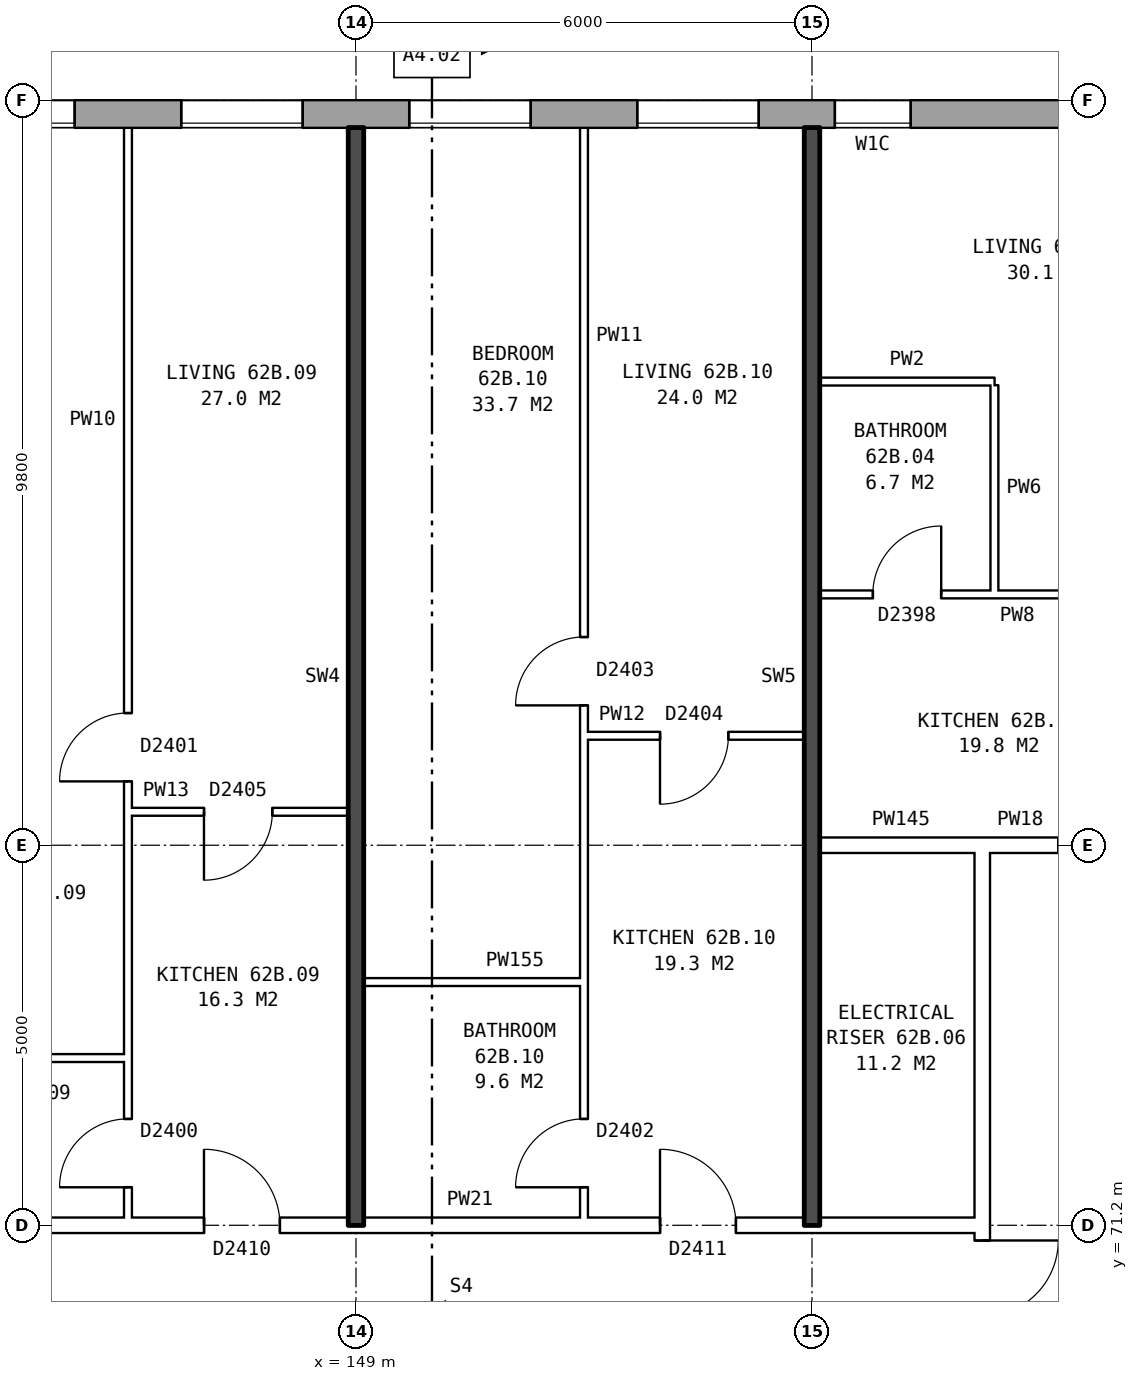
"""IFC4 building model, lengths in metres.
Left out: names, types, materials, properties, quantities, classifications, styles, units other than length and angle.
Written with IfcOpenShell. Run it as: python <this file> out.ifc"""

import sys

from ifc_helpers import new_model, si_unit, direction, frame, frame_2d, origin, place, context, subcontext, project, spatial, rectangle, extrude, element, fill, save


model = new_model("IFC4")
c1 = context("Model", 3, precision=1e-05, world=origin(), true_north=direction((0.0, 1.0)))
c2 = subcontext(c1, "Body", "Model", "MODEL_VIEW")
j1 = project(units=[si_unit("LENGTHUNIT", "METRE"), si_unit("PLANEANGLEUNIT", "RADIAN")], contexts=[c1])
p1 = place(None, origin())
s1 = spatial("IfcSite", under=j1, at=p1, CompositionType="ELEMENT")
p2 = place(p1, origin())
s2 = spatial("IfcBuilding", under=s1, at=p2, CompositionType="ELEMENT")
p3 = place(p2, frame((0.0, 0.0, 221.4)))
s3 = spatial("IfcBuildingStorey", under=s2, at=p3, CompositionType="ELEMENT", Elevation=221.4)
p4 = place(p3, frame((165.925, 85.82, 0.0), z_axis=(0.0, 0.0, 1.0), x_axis=(-1.0, 0.0, 0.0)))
e1 = element("IfcWall", 1, at=p4, inside=s3, PredefinedType="STANDARD", context=c2, shape_type="SweptSolid", body=[
    extrude(rectangle(XDim=33.875, YDim=0.36, at=frame_2d((16.938, 0.0))), origin(), (0.0, 0.0, 1.0), 2.85),
])
p5 = place(p4, frame((2.625, 0.0, 0.8)))
e2 = element("IfcOpeningElement", 2, at=p5, cuts=e1, PredefinedType="OPENING", context=c2, shape_type="SweptSolid", body=[
    extrude(rectangle(XDim=1.6, YDim=1.8, at=frame_2d((0.8, 0.9))), frame((0.0, 0.19, 0.0), z_axis=(0.0, -1.0, 0.0), x_axis=(1.0, 0.0, 0.0)), (0.0, 0.0, 1.0), 0.38),
])
p6 = place(p4, frame((5.625, 0.0, 0.8)))
e3 = element("IfcOpeningElement", 3, at=p6, cuts=e1, PredefinedType="OPENING", context=c2, shape_type="SweptSolid", body=[
    extrude(rectangle(XDim=1.6, YDim=1.8, at=frame_2d((0.8, 0.9))), frame((0.0, 0.19, 0.0), z_axis=(0.0, -1.0, 0.0), x_axis=(1.0, 0.0, 0.0)), (0.0, 0.0, 1.0), 0.38),
])
p7 = place(p4, frame((9.625, 0.0, 0.8)))
e4 = element("IfcOpeningElement", 4, at=p7, cuts=e1, PredefinedType="OPENING", context=c2, shape_type="SweptSolid", body=[
    extrude(rectangle(XDim=1.0, YDim=1.8, at=frame_2d((0.5, 0.9))), frame((0.0, 0.19, 0.0), z_axis=(0.0, -1.0, 0.0), x_axis=(1.0, 0.0, 0.0)), (0.0, 0.0, 1.0), 0.38),
])
p8 = place(p4, frame((11.625, 0.0, 0.8)))
e5 = element("IfcOpeningElement", 5, at=p8, cuts=e1, PredefinedType="OPENING", context=c2, shape_type="SweptSolid", body=[
    extrude(rectangle(XDim=1.6, YDim=1.8, at=frame_2d((0.8, 0.9))), frame((0.0, 0.19, 0.0), z_axis=(0.0, -1.0, 0.0), x_axis=(1.0, 0.0, 0.0)), (0.0, 0.0, 1.0), 0.38),
])
p9 = place(p4, frame((14.625, 0.0, 0.8)))
e6 = element("IfcOpeningElement", 6, at=p9, cuts=e1, PredefinedType="OPENING", context=c2, shape_type="SweptSolid", body=[
    extrude(rectangle(XDim=1.6, YDim=1.8, at=frame_2d((0.8, 0.9))), frame((0.0, 0.19, 0.0), z_axis=(0.0, -1.0, 0.0), x_axis=(1.0, 0.0, 0.0)), (0.0, 0.0, 1.0), 0.38),
])
p10 = place(p4, frame((17.625, 0.0, 0.8)))
e7 = element("IfcOpeningElement", 7, at=p10, cuts=e1, PredefinedType="OPENING", context=c2, shape_type="SweptSolid", body=[
    extrude(rectangle(XDim=1.6, YDim=1.8, at=frame_2d((0.8, 0.9))), frame((0.0, 0.19, 0.0), z_axis=(0.0, -1.0, 0.0), x_axis=(1.0, 0.0, 0.0)), (0.0, 0.0, 1.0), 0.38),
])
p11 = place(p4, frame((20.625, 0.0, 0.8)))
e8 = element("IfcOpeningElement", 8, at=p11, cuts=e1, PredefinedType="OPENING", context=c2, shape_type="SweptSolid", body=[
    extrude(rectangle(XDim=1.6, YDim=1.8, at=frame_2d((0.8, 0.9))), frame((0.0, 0.19, 0.0), z_axis=(0.0, -1.0, 0.0), x_axis=(1.0, 0.0, 0.0)), (0.0, 0.0, 1.0), 0.38),
])
p12 = place(p4, frame((23.825, 0.0, 1.7)))
e9 = element("IfcOpeningElement", 9, at=p12, cuts=e1, PredefinedType="OPENING", context=c2, shape_type="SweptSolid", body=[
    extrude(rectangle(XDim=0.6, YDim=0.9, at=frame_2d((0.3, 0.45))), frame((0.0, 0.19, 0.0), z_axis=(0.0, -1.0, 0.0), x_axis=(1.0, 0.0, 0.0)), (0.0, 0.0, 1.0), 0.38),
])
p13 = place(p4, frame((26.625, 0.0, 0.8)))
e10 = element("IfcOpeningElement", 10, at=p13, cuts=e1, PredefinedType="OPENING", context=c2, shape_type="SweptSolid", body=[
    extrude(rectangle(XDim=1.6, YDim=1.8, at=frame_2d((0.8, 0.9))), frame((0.0, 0.19, 0.0), z_axis=(0.0, -1.0, 0.0), x_axis=(1.0, 0.0, 0.0)), (0.0, 0.0, 1.0), 0.38),
])
p14 = place(p4, frame((29.625, 0.0, 0.8)))
e11 = element("IfcOpeningElement", 11, at=p14, cuts=e1, PredefinedType="OPENING", context=c2, shape_type="SweptSolid", body=[
    extrude(rectangle(XDim=1.6, YDim=1.8, at=frame_2d((0.8, 0.9))), frame((0.0, 0.19, 0.0), z_axis=(0.0, -1.0, 0.0), x_axis=(1.0, 0.0, 0.0)), (0.0, 0.0, 1.0), 0.38),
])
p15 = place(p4, frame((24.725, 0.0, 0.8)))
e12 = element("IfcOpeningElement", 12, at=p15, cuts=e1, PredefinedType="OPENING", context=c2, shape_type="SweptSolid", body=[
    extrude(rectangle(XDim=1.6, YDim=1.8, at=frame_2d((0.8, 0.9))), frame((0.0, 0.19, 0.0), z_axis=(0.0, -1.0, 0.0), x_axis=(1.0, 0.0, 0.0)), (0.0, 0.0, 1.0), 0.38),
])
p16 = place(p3, frame((157.24, 63.9, 0.0), z_axis=(0.0, 0.0, 1.0), x_axis=(0.0, 1.0, 0.0)))
e13 = element("IfcWall", 13, at=p16, inside=s3, PredefinedType="PARTITIONING", context=c2, shape_type="SweptSolid", body=[
    extrude(rectangle(XDim=12.2, YDim=0.2, at=frame_2d((6.1, 0.0))), origin(), (0.0, 0.0, 1.0), 2.85),
])
p17 = place(p16, frame((5.1, 0.0, 0.0)))
e14 = element("IfcOpeningElement", 14, at=p17, cuts=e13, PredefinedType="OPENING", context=c2, shape_type="SweptSolid", body=[
    extrude(rectangle(XDim=2.0, YDim=2.1, at=frame_2d((1.0, 1.05))), frame((0.0, 0.11, 0.0), z_axis=(0.0, -1.0, 0.0), x_axis=(1.0, 0.0, 0.0)), (0.0, 0.0, 1.0), 0.22),
])
p18 = place(p3, frame((142.76, 71.2, 0.0), z_axis=(0.0, 0.0, 1.0), x_axis=(1.0, 0.0, 0.0)))
e15 = element("IfcWall", 15, at=p18, inside=s3, PredefinedType="PARTITIONING", context=c2, shape_type="SweptSolid", body=[
    extrude(rectangle(XDim=14.48, YDim=0.2, at=frame_2d((7.24, 0.0))), origin(), (0.0, 0.0, 1.0), 2.85),
])
p19 = place(p18, frame((4.24, 0.0, 0.0)))
e16 = element("IfcOpeningElement", 16, at=p19, cuts=e15, PredefinedType="OPENING", context=c2, shape_type="SweptSolid", body=[
    extrude(rectangle(XDim=1.0, YDim=2.1, at=frame_2d((0.5, 1.05))), frame((0.0, 0.11, 0.0), z_axis=(0.0, -1.0, 0.0), x_axis=(1.0, 0.0, 0.0)), (0.0, 0.0, 1.0), 0.22),
])
p20 = place(p18, frame((10.24, 0.0, 0.0)))
e17 = element("IfcOpeningElement", 17, at=p20, cuts=e15, PredefinedType="OPENING", context=c2, shape_type="SweptSolid", body=[
    extrude(rectangle(XDim=1.0, YDim=2.1, at=frame_2d((0.5, 1.05))), frame((0.0, 0.11, 0.0), z_axis=(0.0, -1.0, 0.0), x_axis=(1.0, 0.0, 0.0)), (0.0, 0.0, 1.0), 0.22),
])
p21 = place(p3, frame((142.76, 73.4, 0.0), z_axis=(0.0, 0.0, 1.0), x_axis=(1.0, 0.0, 0.0)))
e18 = element("IfcWall", 18, at=p21, inside=s3, PredefinedType="PARTITIONING", context=c2, shape_type="SweptSolid", body=[
    extrude(rectangle(XDim=3.24, YDim=0.1, at=frame_2d((1.62, 0.0))), origin(), (0.0, 0.0, 1.0), 2.85),
])
p22 = place(p3, frame((149.1, 74.4, 0.0), z_axis=(0.0, 0.0, 1.0), x_axis=(1.0, 0.0, 0.0)))
e19 = element("IfcWall", 19, at=p22, inside=s3, PredefinedType="PARTITIONING", context=c2, shape_type="SweptSolid", body=[
    extrude(rectangle(XDim=2.9, YDim=0.1, at=frame_2d((1.45, 0.0))), origin(), (0.0, 0.0, 1.0), 2.85),
])
p23 = place(p3, frame((155.1, 76.2, 0.0), z_axis=(0.0, 0.0, 1.0), x_axis=(1.0, 0.0, 0.0)))
e20 = element("IfcWall", 20, at=p23, inside=s3, PredefinedType="PARTITIONING", context=c2, shape_type="SweptSolid", body=[
    extrude(rectangle(XDim=2.14, YDim=0.2, at=frame_2d((1.07, 0.0))), origin(), (0.0, 0.0, 1.0), 2.85),
])
p24 = place(p3, frame((157.24, 76.2, 0.0), z_axis=(0.0, 0.0, 1.0), x_axis=(1.0, 0.0, 0.0)))
e21 = element("IfcWall", 21, at=p24, inside=s3, PredefinedType="PARTITIONING", context=c2, shape_type="SweptSolid", body=[
    extrude(rectangle(XDim=3.0, YDim=0.2, at=frame_2d((1.5, 0.0))), origin(), (0.0, 0.0, 1.0), 2.85),
])
p25 = place(p24, frame((1.0, 0.0, 0.0)))
e22 = element("IfcOpeningElement", 22, at=p25, cuts=e21, PredefinedType="OPENING", context=c2, shape_type="SweptSolid", body=[
    extrude(rectangle(XDim=1.0, YDim=2.1, at=frame_2d((0.5, 1.05))), frame((0.0, 0.11, 0.0), z_axis=(0.0, -1.0, 0.0), x_axis=(1.0, 0.0, 0.0)), (0.0, 0.0, 1.0), 0.22),
])
p26 = place(p3, frame((146.0, 76.64, 0.0), z_axis=(0.0, 0.0, 1.0), x_axis=(1.0, 0.0, 0.0)))
e23 = element("IfcWall", 23, at=p26, inside=s3, PredefinedType="PARTITIONING", context=c2, shape_type="SweptSolid", body=[
    extrude(rectangle(XDim=2.9, YDim=0.1, at=frame_2d((1.45, 0.0))), origin(), (0.0, 0.0, 1.0), 2.85),
])
p27 = place(p26, frame((1.0, 0.0, 0.0)))
e24 = element("IfcOpeningElement", 24, at=p27, cuts=e23, PredefinedType="OPENING", context=c2, shape_type="SweptSolid", body=[
    extrude(rectangle(XDim=0.9, YDim=2.1, at=frame_2d((0.45, 1.05))), frame((0.0, 0.06, 0.0), z_axis=(0.0, -1.0, 0.0), x_axis=(1.0, 0.0, 0.0)), (0.0, 0.0, 1.0), 0.12),
])
p28 = place(p3, frame((152.0, 77.64, 0.0), z_axis=(0.0, 0.0, 1.0), x_axis=(1.0, 0.0, 0.0)))
e25 = element("IfcWall", 25, at=p28, inside=s3, PredefinedType="PARTITIONING", context=c2, shape_type="SweptSolid", body=[
    extrude(rectangle(XDim=2.9, YDim=0.1, at=frame_2d((1.45, 0.0))), origin(), (0.0, 0.0, 1.0), 2.85),
])
p29 = place(p28, frame((1.0, 0.0, 0.0)))
e26 = element("IfcOpeningElement", 26, at=p29, cuts=e25, PredefinedType="OPENING", context=c2, shape_type="SweptSolid", body=[
    extrude(rectangle(XDim=0.9, YDim=2.1, at=frame_2d((0.45, 1.05))), frame((0.0, 0.06, 0.0), z_axis=(0.0, -1.0, 0.0), x_axis=(1.0, 0.0, 0.0)), (0.0, 0.0, 1.0), 0.12),
])
p30 = place(p3, frame((155.1, 79.5, 0.0), z_axis=(0.0, 0.0, 1.0), x_axis=(1.0, 0.0, 0.0)))
e27 = element("IfcWall", 27, at=p30, inside=s3, PredefinedType="PARTITIONING", context=c2, shape_type="SweptSolid", body=[
    extrude(rectangle(XDim=5.8, YDim=0.1, at=frame_2d((2.9, 0.0))), origin(), (0.0, 0.0, 1.0), 2.85),
])
p31 = place(p30, frame((3.6, 0.0, 0.0)))
e28 = element("IfcOpeningElement", 28, at=p31, cuts=e27, PredefinedType="OPENING", context=c2, shape_type="SweptSolid", body=[
    extrude(rectangle(XDim=0.9, YDim=2.1, at=frame_2d((0.45, 1.05))), frame((0.0, 0.06, 0.0), z_axis=(0.0, -1.0, 0.0), x_axis=(1.0, 0.0, 0.0)), (0.0, 0.0, 1.0), 0.12),
])
p32 = place(p30, frame((0.7, 0.0, 0.0)))
e29 = element("IfcOpeningElement", 29, at=p32, cuts=e27, PredefinedType="OPENING", context=c2, shape_type="SweptSolid", body=[
    extrude(rectangle(XDim=0.9, YDim=2.1, at=frame_2d((0.45, 1.05))), frame((0.0, 0.06, 0.0), z_axis=(0.0, -1.0, 0.0), x_axis=(1.0, 0.0, 0.0)), (0.0, 0.0, 1.0), 0.12),
])
p33 = place(p3, frame((155.1, 82.3, 0.0), z_axis=(0.0, 0.0, 1.0), x_axis=(1.0, 0.0, 0.0)))
e30 = element("IfcWall", 30, at=p33, inside=s3, PredefinedType="PARTITIONING", context=c2, shape_type="SweptSolid", body=[
    extrude(rectangle(XDim=2.3, YDim=0.1, at=frame_2d((1.15, 0.0))), origin(), (0.0, 0.0, 1.0), 2.85),
])
p34 = place(p3, frame((146.0, 71.3, 0.0), z_axis=(0.0, 0.0, 1.0), x_axis=(0.0, 1.0, 0.0)))
e31 = element("IfcWall", 31, at=p34, inside=s3, PredefinedType="PARTITIONING", context=c2, shape_type="SweptSolid", body=[
    extrude(rectangle(XDim=14.34, YDim=0.1, at=frame_2d((7.17, 0.0))), origin(), (0.0, 0.0, 1.0), 2.85),
])
p35 = place(p34, frame((5.74, 0.0, 0.0)))
e32 = element("IfcOpeningElement", 32, at=p35, cuts=e31, PredefinedType="OPENING", context=c2, shape_type="SweptSolid", body=[
    extrude(rectangle(XDim=0.9, YDim=2.1, at=frame_2d((0.45, 1.05))), frame((0.0, 0.06, 0.0), z_axis=(0.0, -1.0, 0.0), x_axis=(1.0, 0.0, 0.0)), (0.0, 0.0, 1.0), 0.12),
])
p36 = place(p34, frame((0.4, 0.0, 0.0)))
e33 = element("IfcOpeningElement", 33, at=p36, cuts=e31, PredefinedType="OPENING", context=c2, shape_type="SweptSolid", body=[
    extrude(rectangle(XDim=0.9, YDim=2.1, at=frame_2d((0.45, 1.05))), frame((0.0, 0.06, 0.0), z_axis=(0.0, -1.0, 0.0), x_axis=(1.0, 0.0, 0.0)), (0.0, 0.0, 1.0), 0.12),
])
p37 = place(p3, frame((149.0, 71.2, 0.0), z_axis=(0.0, 0.0, 1.0), x_axis=(0.0, 1.0, 0.0)))
e34 = element("IfcWall", 34, at=p37, inside=s3, PredefinedType="SOLIDWALL", context=c2, shape_type="SweptSolid", body=[
    extrude(rectangle(XDim=14.44, YDim=0.2, at=frame_2d((7.22, 0.0))), origin(), (0.0, 0.0, 1.0), 2.85),
])
p38 = place(p3, frame((152.0, 71.3, 0.0), z_axis=(0.0, 0.0, 1.0), x_axis=(0.0, 1.0, 0.0)))
e35 = element("IfcWall", 35, at=p38, inside=s3, PredefinedType="PARTITIONING", context=c2, shape_type="SweptSolid", body=[
    extrude(rectangle(XDim=14.34, YDim=0.1, at=frame_2d((7.17, 0.0))), origin(), (0.0, 0.0, 1.0), 2.85),
])
p39 = place(p38, frame((6.74, 0.0, 0.0)))
e36 = element("IfcOpeningElement", 36, at=p39, cuts=e35, PredefinedType="OPENING", context=c2, shape_type="SweptSolid", body=[
    extrude(rectangle(XDim=0.9, YDim=2.1, at=frame_2d((0.45, 1.05))), frame((0.0, 0.06, 0.0), z_axis=(0.0, -1.0, 0.0), x_axis=(1.0, 0.0, 0.0)), (0.0, 0.0, 1.0), 0.12),
])
p40 = place(p38, frame((0.4, 0.0, 0.0)))
e37 = element("IfcOpeningElement", 37, at=p40, cuts=e35, PredefinedType="OPENING", context=c2, shape_type="SweptSolid", body=[
    extrude(rectangle(XDim=0.9, YDim=2.1, at=frame_2d((0.45, 1.05))), frame((0.0, 0.06, 0.0), z_axis=(0.0, -1.0, 0.0), x_axis=(1.0, 0.0, 0.0)), (0.0, 0.0, 1.0), 0.12),
])
p41 = place(p3, frame((155.0, 71.2, 0.0), z_axis=(0.0, 0.0, 1.0), x_axis=(0.0, 1.0, 0.0)))
e38 = element("IfcWall", 38, at=p41, inside=s3, PredefinedType="SOLIDWALL", context=c2, shape_type="SweptSolid", body=[
    extrude(rectangle(XDim=14.44, YDim=0.2, at=frame_2d((7.22, 0.0))), origin(), (0.0, 0.0, 1.0), 2.85),
])
p42 = place(p3, frame((157.4, 79.55, 0.0), z_axis=(0.0, 0.0, 1.0), x_axis=(0.0, 1.0, 0.0)))
e39 = element("IfcWall", 39, at=p42, inside=s3, PredefinedType="PARTITIONING", context=c2, shape_type="SweptSolid", body=[
    extrude(rectangle(XDim=2.7, YDim=0.1, at=frame_2d((1.35, 0.0))), origin(), (0.0, 0.0, 1.0), 2.85),
])
p43 = place(p7, origin())
e40 = element("IfcWindow", 40, at=p43, inside=s3, PartitioningType="SINGLE_PANEL", PredefinedType="WINDOW", context=c2, shape_type="SweptSolid", body=[
    extrude(rectangle(XDim=1.0, YDim=1.8, at=frame_2d((0.5, 0.9))), frame((0.0, 0.15, 0.0), z_axis=(0.0, -1.0, 0.0), x_axis=(1.0, 0.0, 0.0)), (0.0, 0.0, 1.0), 0.06),
])
fill(e4, e40)
p44 = place(p8, origin())
e41 = element("IfcWindow", 41, at=p44, inside=s3, PartitioningType="SINGLE_PANEL", PredefinedType="WINDOW", context=c2, shape_type="SweptSolid", body=[
    extrude(rectangle(XDim=1.6, YDim=1.8, at=frame_2d((0.8, 0.9))), frame((0.0, 0.15, 0.0), z_axis=(0.0, -1.0, 0.0), x_axis=(1.0, 0.0, 0.0)), (0.0, 0.0, 1.0), 0.06),
])
fill(e5, e41)
p45 = place(p9, origin())
e42 = element("IfcWindow", 42, at=p45, inside=s3, PartitioningType="SINGLE_PANEL", PredefinedType="WINDOW", context=c2, shape_type="SweptSolid", body=[
    extrude(rectangle(XDim=1.6, YDim=1.8, at=frame_2d((0.8, 0.9))), frame((0.0, 0.15, 0.0), z_axis=(0.0, -1.0, 0.0), x_axis=(1.0, 0.0, 0.0)), (0.0, 0.0, 1.0), 0.06),
])
fill(e6, e42)
p46 = place(p10, origin())
e43 = element("IfcWindow", 43, at=p46, inside=s3, PartitioningType="SINGLE_PANEL", PredefinedType="WINDOW", context=c2, shape_type="SweptSolid", body=[
    extrude(rectangle(XDim=1.6, YDim=1.8, at=frame_2d((0.8, 0.9))), frame((0.0, 0.15, 0.0), z_axis=(0.0, -1.0, 0.0), x_axis=(1.0, 0.0, 0.0)), (0.0, 0.0, 1.0), 0.06),
])
fill(e7, e43)
p47 = place(p11, origin())
e44 = element("IfcWindow", 44, at=p47, inside=s3, PartitioningType="SINGLE_PANEL", PredefinedType="WINDOW", context=c2, shape_type="SweptSolid", body=[
    extrude(rectangle(XDim=1.6, YDim=1.8, at=frame_2d((0.8, 0.9))), frame((0.0, 0.15, 0.0), z_axis=(0.0, -1.0, 0.0), x_axis=(1.0, 0.0, 0.0)), (0.0, 0.0, 1.0), 0.06),
])
fill(e8, e44)
p48 = place(p17, frame((2.0, 0.0, 0.0), z_axis=(0.0, 0.0, 1.0), x_axis=(-1.0, 0.0, 0.0)))
e45 = element("IfcDoor", 45, at=p48, inside=s3, OperationType="DOUBLE_DOOR_SINGLE_SWING", PredefinedType="DOOR", context=c2, shape_type="SweptSolid", body=[
    extrude(rectangle(XDim=2.0, YDim=2.1, at=frame_2d((1.0, 1.05))), frame((0.0, 0.025, 0.0), z_axis=(0.0, -1.0, 0.0), x_axis=(1.0, 0.0, 0.0)), (0.0, 0.0, 1.0), 0.05),
])
fill(e14, e45)
p49 = place(p32, origin())
e46 = element("IfcDoor", 46, at=p49, inside=s3, OperationType="SINGLE_SWING_RIGHT", PredefinedType="DOOR", context=c2, shape_type="SweptSolid", body=[
    extrude(rectangle(XDim=0.9, YDim=2.1, at=frame_2d((0.45, 1.05))), frame((0.0, 0.025, 0.0), z_axis=(0.0, -1.0, 0.0), x_axis=(1.0, 0.0, 0.0)), (0.0, 0.0, 1.0), 0.05),
])
fill(e29, e46)
p50 = place(p35, origin())
e47 = element("IfcDoor", 47, at=p50, inside=s3, OperationType="SINGLE_SWING_LEFT", PredefinedType="DOOR", context=c2, shape_type="SweptSolid", body=[
    extrude(rectangle(XDim=0.9, YDim=2.1, at=frame_2d((0.45, 1.05))), frame((0.0, 0.025, 0.0), z_axis=(0.0, -1.0, 0.0), x_axis=(1.0, 0.0, 0.0)), (0.0, 0.0, 1.0), 0.05),
])
fill(e32, e47)
p51 = place(p19, origin())
e48 = element("IfcDoor", 48, at=p51, inside=s3, OperationType="SINGLE_SWING_LEFT", PredefinedType="DOOR", context=c2, shape_type="SweptSolid", body=[
    extrude(rectangle(XDim=1.0, YDim=2.1, at=frame_2d((0.5, 1.05))), frame((0.0, 0.025, 0.0), z_axis=(0.0, -1.0, 0.0), x_axis=(1.0, 0.0, 0.0)), (0.0, 0.0, 1.0), 0.05),
])
fill(e16, e48)
p52 = place(p27, frame((0.9, 0.0, 0.0), z_axis=(0.0, 0.0, 1.0), x_axis=(-1.0, 0.0, 0.0)))
e49 = element("IfcDoor", 49, at=p52, inside=s3, OperationType="SINGLE_SWING_RIGHT", PredefinedType="DOOR", context=c2, shape_type="SweptSolid", body=[
    extrude(rectangle(XDim=0.9, YDim=2.1, at=frame_2d((0.45, 1.05))), frame((0.0, 0.025, 0.0), z_axis=(0.0, -1.0, 0.0), x_axis=(1.0, 0.0, 0.0)), (0.0, 0.0, 1.0), 0.05),
])
fill(e24, e49)
p53 = place(p36, origin())
e50 = element("IfcDoor", 50, at=p53, inside=s3, OperationType="SINGLE_SWING_LEFT", PredefinedType="DOOR", context=c2, shape_type="SweptSolid", body=[
    extrude(rectangle(XDim=0.9, YDim=2.1, at=frame_2d((0.45, 1.05))), frame((0.0, 0.025, 0.0), z_axis=(0.0, -1.0, 0.0), x_axis=(1.0, 0.0, 0.0)), (0.0, 0.0, 1.0), 0.05),
])
fill(e33, e50)
p54 = place(p39, origin())
e51 = element("IfcDoor", 51, at=p54, inside=s3, OperationType="SINGLE_SWING_LEFT", PredefinedType="DOOR", context=c2, shape_type="SweptSolid", body=[
    extrude(rectangle(XDim=0.9, YDim=2.1, at=frame_2d((0.45, 1.05))), frame((0.0, 0.025, 0.0), z_axis=(0.0, -1.0, 0.0), x_axis=(1.0, 0.0, 0.0)), (0.0, 0.0, 1.0), 0.05),
])
fill(e36, e51)
p55 = place(p20, origin())
e52 = element("IfcDoor", 52, at=p55, inside=s3, OperationType="SINGLE_SWING_LEFT", PredefinedType="DOOR", context=c2, shape_type="SweptSolid", body=[
    extrude(rectangle(XDim=1.0, YDim=2.1, at=frame_2d((0.5, 1.05))), frame((0.0, 0.025, 0.0), z_axis=(0.0, -1.0, 0.0), x_axis=(1.0, 0.0, 0.0)), (0.0, 0.0, 1.0), 0.05),
])
fill(e17, e52)
p56 = place(p29, frame((0.9, 0.0, 0.0), z_axis=(0.0, 0.0, 1.0), x_axis=(-1.0, 0.0, 0.0)))
e53 = element("IfcDoor", 53, at=p56, inside=s3, OperationType="SINGLE_SWING_RIGHT", PredefinedType="DOOR", context=c2, shape_type="SweptSolid", body=[
    extrude(rectangle(XDim=0.9, YDim=2.1, at=frame_2d((0.45, 1.05))), frame((0.0, 0.025, 0.0), z_axis=(0.0, -1.0, 0.0), x_axis=(1.0, 0.0, 0.0)), (0.0, 0.0, 1.0), 0.05),
])
fill(e26, e53)
p57 = place(p40, origin())
e54 = element("IfcDoor", 54, at=p57, inside=s3, OperationType="SINGLE_SWING_LEFT", PredefinedType="DOOR", context=c2, shape_type="SweptSolid", body=[
    extrude(rectangle(XDim=0.9, YDim=2.1, at=frame_2d((0.45, 1.05))), frame((0.0, 0.025, 0.0), z_axis=(0.0, -1.0, 0.0), x_axis=(1.0, 0.0, 0.0)), (0.0, 0.0, 1.0), 0.05),
])
fill(e37, e54)
save(model, sys.argv[1])
